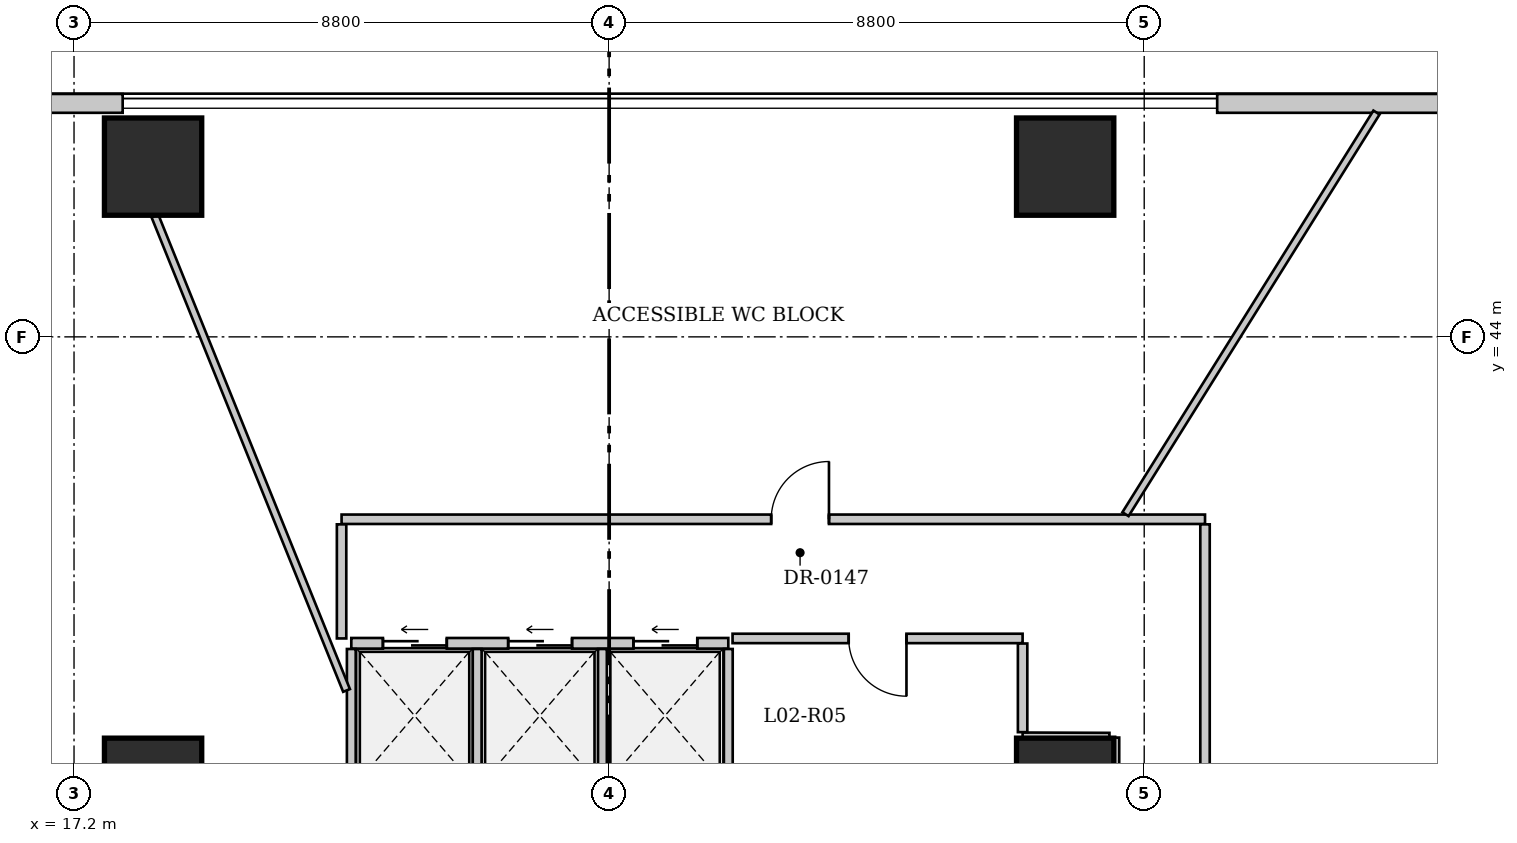
"""IFC4 building model, lengths in metres.
Left out: names, types, materials, properties, quantities, classifications, styles, units other than length and angle.
Written with IfcOpenShell. Run it as: python <this file> out.ifc"""

import sys

from ifc_helpers import new_model, si_unit, direction, frame, frame_2d, origin, origin_2d, place, context, subcontext, project, spatial, rectangle, extrude, source, transform, mapped, element, fill, save


model = new_model("IFC4")
c1 = context("Model", 3, precision=1e-05, world=origin(), true_north=direction((0.0, 1.0)))
c2 = subcontext(c1, "Body", "Model", "MODEL_VIEW")
j1 = project(units=[si_unit("LENGTHUNIT", "METRE"), si_unit("PLANEANGLEUNIT", "RADIAN")], contexts=[c1])
p1 = place(None, origin())
s1 = spatial("IfcSite", under=j1, at=p1, CompositionType="ELEMENT")
p2 = place(p1, origin())
s2 = spatial("IfcBuilding", under=s1, at=p2, CompositionType="ELEMENT")
p3 = place(p2, frame((0.0, 0.0, 9.8)))
s3 = spatial("IfcBuildingStorey", under=s2, at=p3, CompositionType="ELEMENT", Elevation=9.8)
for number, where, z_axis, x_axis in (
    (1, (18.5, 46.8, 0.0), (0.0, 0.0, 1.0), (1.0, 0.0, 0.0)),
    (2, (33.5, 46.8, 0.0), (0.0, 0.0, 1.0), (1.0, 0.0, 0.0)),
    (3, (18.5, 36.6, 0.0), (0.0, 0.0, 1.0), (1.0, 0.0, 0.0)),
    (4, (33.5, 36.6, 0.0), (0.0, 0.0, 1.0), (1.0, 0.0, 0.0)),
):
    element("IfcColumn", number, at=place(p3, frame(where, z_axis=z_axis, x_axis=x_axis)), inside=s3, PredefinedType="COLUMN", context=c2, shape_type="SweptSolid", body=[
        extrude(rectangle(XDim=1.6, YDim=1.6, at=origin_2d()), origin(), (0.0, 0.0, 1.0), 4.3),
    ])
p4 = place(p3, frame((0.16, 47.84, 0.0), z_axis=(0.0, 0.0, 1.0), x_axis=(1.0, 0.0, 0.0)))
e5 = element("IfcWall", 5, at=p4, inside=s3, PredefinedType="SOLIDWALL", context=c2, shape_type="SweptSolid", body=[
    extrude(rectangle(XDim=17.84, YDim=0.31, at=frame_2d((8.92, 0.0))), origin(), (0.0, 0.0, 1.0), 4.05),
])
p5 = place(p4, frame((7.0, 0.0, 0.95)))
e6 = element("IfcOpeningElement", 6, at=p5, cuts=e5, PredefinedType="OPENING", context=c2, shape_type="SweptSolid", body=[
    extrude(rectangle(XDim=1.4, YDim=2.2, at=frame_2d((0.7, 1.1))), frame((0.0, 0.165, 0.0), z_axis=(0.0, -1.0, 0.0), x_axis=(1.0, 0.0, 0.0)), (0.0, 0.0, 1.0), 0.33),
])
p6 = place(p4, frame((12.5, 0.0, 0.95)))
e7 = element("IfcOpeningElement", 7, at=p6, cuts=e5, PredefinedType="OPENING", context=c2, shape_type="SweptSolid", body=[
    extrude(rectangle(XDim=1.4, YDim=2.2, at=frame_2d((0.7, 1.1))), frame((0.0, 0.165, 0.0), z_axis=(0.0, -1.0, 0.0), x_axis=(1.0, 0.0, 0.0)), (0.0, 0.0, 1.0), 0.33),
])
p7 = place(p3, frame((36.0, 47.84, 0.0), z_axis=(0.0, 0.0, 1.0), x_axis=(1.0, 0.0, 0.0)))
e8 = element("IfcWall", 8, at=p7, inside=s3, PredefinedType="SOLIDWALL", context=c2, shape_type="SweptSolid", body=[
    extrude(rectangle(XDim=15.84, YDim=0.31, at=frame_2d((7.92, 0.0))), origin(), (0.0, 0.0, 1.0), 4.05),
])
p8 = place(p7, frame((4.05, 0.0, 0.95)))
e9 = element("IfcOpeningElement", 9, at=p8, cuts=e8, PredefinedType="OPENING", context=c2, shape_type="SweptSolid", body=[
    extrude(rectangle(XDim=1.4, YDim=2.2, at=frame_2d((0.7, 1.1))), frame((0.0, 0.165, 0.0), z_axis=(0.0, -1.0, 0.0), x_axis=(1.0, 0.0, 0.0)), (0.0, 0.0, 1.0), 0.33),
])
p9 = place(p7, frame((10.0, 0.0, 0.95)))
e10 = element("IfcOpeningElement", 10, at=p9, cuts=e8, PredefinedType="OPENING", context=c2, shape_type="SweptSolid", body=[
    extrude(rectangle(XDim=1.4, YDim=2.2, at=frame_2d((0.7, 1.1))), frame((0.0, 0.165, 0.0), z_axis=(0.0, -1.0, 0.0), x_axis=(1.0, 0.0, 0.0)), (0.0, 0.0, 1.0), 0.33),
])
p10 = place(p3, frame((21.76, 38.96, 0.0), z_axis=(0.0, 0.0, 1.0), x_axis=(1.0, 0.0, 0.0)))
e11 = element("IfcWall", 11, at=p10, inside=s3, PredefinedType="SOLIDWALL", context=c2, shape_type="SweptSolid", body=[
    extrude(rectangle(XDim=6.2, YDim=0.175, at=frame_2d((3.1, 0.0))), origin(), (0.0, 0.0, 1.0), 4.3),
])
p11 = place(p10, frame((0.52, 0.0, 0.0)))
e12 = element("IfcOpeningElement", 12, at=p11, cuts=e11, PredefinedType="OPENING", context=c2, shape_type="SweptSolid", body=[
    extrude(rectangle(XDim=1.05, YDim=2.15, at=frame_2d((0.525, 1.075))), frame((0.0, 0.098, 0.0), z_axis=(0.0, -1.0, 0.0), x_axis=(1.0, 0.0, 0.0)), (0.0, 0.0, 1.0), 0.195),
])
p12 = place(p10, frame((2.58, 0.0, 0.0)))
e13 = element("IfcOpeningElement", 13, at=p12, cuts=e11, PredefinedType="OPENING", context=c2, shape_type="SweptSolid", body=[
    extrude(rectangle(XDim=1.05, YDim=2.15, at=frame_2d((0.525, 1.075))), frame((0.0, 0.098, 0.0), z_axis=(0.0, -1.0, 0.0), x_axis=(1.0, 0.0, 0.0)), (0.0, 0.0, 1.0), 0.195),
])
p13 = place(p10, frame((4.64, 0.0, 0.0)))
e14 = element("IfcOpeningElement", 14, at=p13, cuts=e11, PredefinedType="OPENING", context=c2, shape_type="SweptSolid", body=[
    extrude(rectangle(XDim=1.05, YDim=2.15, at=frame_2d((0.525, 1.075))), frame((0.0, 0.098, 0.0), z_axis=(0.0, -1.0, 0.0), x_axis=(1.0, 0.0, 0.0)), (0.0, 0.0, 1.0), 0.195),
])
for number, where, z_axis, x_axis in (
    (15, (21.76, 36.6, 0.0), (0.0, 0.0, 1.0), (0.0, 1.0, 0.0)),
    (16, (27.96, 36.6, 0.0), (0.0, 0.0, 1.0), (0.0, 1.0, 0.0)),
):
    element("IfcWall", number, at=place(p3, frame(where, z_axis=z_axis, x_axis=x_axis)), inside=s3, PredefinedType="SOLIDWALL", context=c2, shape_type="SweptSolid", body=[
        extrude(rectangle(XDim=2.266, YDim=0.145, at=frame_2d((1.133, 0.0))), origin(), (0.0, 0.0, 1.0), 4.3),
    ])
for number, where, z_axis, x_axis in (
    (17, (23.83, 36.66, 0.0), (0.0, 0.0, 1.0), (0.0, 1.0, 0.0)),
    (18, (25.89, 36.66, 0.0), (0.0, 0.0, 1.0), (0.0, 1.0, 0.0)),
):
    element("IfcWall", number, at=place(p3, frame(where, z_axis=z_axis, x_axis=x_axis)), inside=s3, PredefinedType="SOLIDWALL", context=c2, shape_type="SweptSolid", body=[
        extrude(rectangle(XDim=2.207, YDim=0.145, at=frame_2d((1.103, 0.0))), origin(), (0.0, 0.0, 1.0), 4.3),
    ])
p14 = place(p3, frame((32.8, 39.04, 0.0), z_axis=(0.0, 0.0, 1.0), x_axis=(-1.0, 0.0, 0.0)))
e19 = element("IfcWall", 19, at=p14, inside=s3, PredefinedType="PARTITIONING", context=c2, shape_type="SweptSolid", body=[
    extrude(rectangle(XDim=4.77, YDim=0.155, at=frame_2d((2.385, 0.0))), origin(), (0.0, 0.0, 1.0), 4.3),
])
p15 = place(p14, frame((1.91, 0.0, 0.0)))
e20 = element("IfcOpeningElement", 20, at=p15, cuts=e19, PredefinedType="OPENING", context=c2, shape_type="SweptSolid", body=[
    extrude(rectangle(XDim=0.95, YDim=2.15, at=frame_2d((0.475, 1.075))), frame((0.0, 0.087, 0.0), z_axis=(0.0, -1.0, 0.0), x_axis=(1.0, 0.0, 0.0)), (0.0, 0.0, 1.0), 0.175),
])
p16 = place(p3, frame((21.6, 41.0, 0.0), z_axis=(0.0, 0.0, 1.0), x_axis=(1.0, 0.0, 0.0)))
e21 = element("IfcWall", 21, at=p16, inside=s3, PredefinedType="PARTITIONING", context=c2, shape_type="SweptSolid", body=[
    extrude(rectangle(XDim=14.2, YDim=0.155, at=frame_2d((7.1, 0.0))), origin(), (0.0, 0.0, 1.0), 4.3),
])
p17 = place(p16, frame((7.065, 0.0, 0.0)))
e22 = element("IfcOpeningElement", 22, at=p17, cuts=e21, PredefinedType="OPENING", context=c2, shape_type="SweptSolid", body=[
    extrude(rectangle(XDim=0.95, YDim=2.15, at=frame_2d((0.475, 1.075))), frame((0.0, 0.087, 0.0), z_axis=(0.0, -1.0, 0.0), x_axis=(1.0, 0.0, 0.0)), (0.0, 0.0, 1.0), 0.175),
])
p18 = place(p3, frame((35.8, 40.917, 0.0), z_axis=(0.0, 0.0, 1.0), x_axis=(0.0, -1.0, 0.0)))
e23 = element("IfcWall", 23, at=p18, inside=s3, PredefinedType="PARTITIONING", context=c2, shape_type="SweptSolid", body=[
    extrude(rectangle(XDim=14.796, YDim=0.155, at=frame_2d((7.398, 0.0))), origin(), (0.0, 0.0, 1.0), 4.3),
])
p19 = place(p18, frame((5.195, 0.0, 0.0)))
e24 = element("IfcOpeningElement", 24, at=p19, cuts=e23, PredefinedType="OPENING", context=c2, shape_type="SweptSolid", body=[
    extrude(rectangle(XDim=1.0, YDim=2.15, at=frame_2d((0.5, 1.075))), frame((0.0, 0.087, 0.0), z_axis=(0.0, -1.0, 0.0), x_axis=(1.0, 0.0, 0.0)), (0.0, 0.0, 1.0), 0.175),
])
p20 = place(p3, frame((34.311, 35.873, 0.0), z_axis=(0.0, 0.0, 1.0), x_axis=(0.000476644369, 0.999999886405, 0.0)))
e25 = element("IfcWall", 25, at=p20, inside=s3, PredefinedType="PARTITIONING", context=c2, shape_type="SweptSolid", body=[
    extrude(rectangle(XDim=1.537, YDim=0.155, at=frame_2d((0.768, 0.0))), origin(), (0.0, 0.0, 1.0), 4.3),
])
p21 = place(p3, frame((34.228, 37.41, 0.0), z_axis=(0.0, 0.0, 1.0), x_axis=(-0.999993554729, 0.003590334185, 0.0)))
e26 = element("IfcWall", 26, at=p21, inside=s3, PredefinedType="PARTITIONING", context=c2, shape_type="SweptSolid", body=[
    extrude(rectangle(XDim=1.428, YDim=0.155, at=frame_2d((0.714, 0.0))), origin(), (0.0, 0.0, 1.0), 4.3),
])
p22 = place(p3, frame((32.8, 37.499, 0.0), z_axis=(0.0, 0.0, 1.0), x_axis=(0.0, 1.0, 0.0)))
e27 = element("IfcWall", 27, at=p22, inside=s3, PredefinedType="PARTITIONING", context=c2, shape_type="SweptSolid", body=[
    extrude(rectangle(XDim=1.458, YDim=0.155, at=frame_2d((0.729, 0.0))), origin(), (0.0, 0.0, 1.0), 4.3),
])
p23 = place(p3, frame((21.6, 39.04, 0.0), z_axis=(0.0, 0.0, 1.0), x_axis=(0.0, 1.0, 0.0)))
e28 = element("IfcWall", 28, at=p23, inside=s3, PredefinedType="PARTITIONING", context=c2, shape_type="SweptSolid", body=[
    extrude(rectangle(XDim=1.876, YDim=0.155, at=frame_2d((0.938, 0.0))), origin(), (0.0, 0.0, 1.0), 4.3),
])
p24 = place(p3, frame((34.492, 41.083, 0.0), z_axis=(0.0, 0.0, 1.0), x_axis=(0.529897521228, 0.848061682306, 0.0)))
e29 = element("IfcWall", 29, at=p24, inside=s3, PredefinedType="PARTITIONING", context=c2, shape_type="SweptSolid", body=[
    extrude(rectangle(XDim=7.79, YDim=0.12, at=frame_2d((3.895, 0.0))), origin(), (0.0, 0.0, 1.0), 4.3),
])
p25 = place(p3, frame((21.681, 38.184, 0.0), z_axis=(0.0, 0.0, 1.0), x_axis=(-0.374369058087, 0.927279789679, 0.0)))
e30 = element("IfcWall", 30, at=p25, inside=s3, PredefinedType="PARTITIONING", context=c2, shape_type="SweptSolid", body=[
    extrude(rectangle(XDim=8.418, YDim=0.12, at=frame_2d((4.209, 0.0))), origin(), (0.0, 0.0, 1.0), 4.3),
])
m1 = source(origin(), c2, "Body", "SweptSolid", [
    extrude(rectangle(XDim=1.05, YDim=2.15, at=frame_2d((0.525, 1.075))), frame((0.0, 0.025, 0.0), z_axis=(0.0, -1.0, 0.0), x_axis=(1.0, 0.0, 0.0)), (0.0, 0.0, 1.0), 0.05),
])
p26 = place(p11, origin())
e31 = element("IfcDoor", 31, at=p26, inside=s3, OperationType="SLIDING_TO_LEFT", PredefinedType="DOOR", context=c2, shape_type="MappedRepresentation", body=[
    mapped(m1, transform((0.0, 0.0, 0.0), x_axis=(1.0, 0.0, 0.0), y_axis=(0.0, 1.0, 0.0), z_axis=(0.0, 0.0, 1.0), scale=1.0)),
])
fill(e12, e31)
p27 = place(p12, origin())
e32 = element("IfcDoor", 32, at=p27, inside=s3, OperationType="SLIDING_TO_LEFT", PredefinedType="DOOR", context=c2, shape_type="MappedRepresentation", body=[
    mapped(m1, transform((0.0, 0.0, 0.0), x_axis=(1.0, 0.0, 0.0), y_axis=(0.0, 1.0, 0.0), z_axis=(0.0, 0.0, 1.0), scale=1.0)),
])
fill(e13, e32)
p28 = place(p13, origin())
e33 = element("IfcDoor", 33, at=p28, inside=s3, OperationType="SLIDING_TO_LEFT", PredefinedType="DOOR", context=c2, shape_type="MappedRepresentation", body=[
    mapped(m1, transform((0.0, 0.0, 0.0), x_axis=(1.0, 0.0, 0.0), y_axis=(0.0, 1.0, 0.0), z_axis=(0.0, 0.0, 1.0), scale=1.0)),
])
fill(e14, e33)
m2 = source(origin(), c2, "Body", "SweptSolid", [
    extrude(rectangle(XDim=0.95, YDim=2.15, at=frame_2d((0.475, 1.075))), frame((0.0, 0.025, 0.0), z_axis=(0.0, -1.0, 0.0), x_axis=(1.0, 0.0, 0.0)), (0.0, 0.0, 1.0), 0.05),
])
p29 = place(p15, origin())
e34 = element("IfcDoor", 34, at=p29, inside=s3, OperationType="SINGLE_SWING_LEFT", PredefinedType="DOOR", context=c2, shape_type="MappedRepresentation", body=[
    mapped(m2, transform((0.0, 0.0, 0.0), x_axis=(1.0, 0.0, 0.0), y_axis=(0.0, 1.0, 0.0), z_axis=(0.0, 0.0, 1.0), scale=1.0)),
])
fill(e20, e34)
p30 = place(p17, origin())
e35 = element("IfcDoor", 35, at=p30, inside=s3, OperationType="SINGLE_SWING_RIGHT", PredefinedType="DOOR", context=c2, shape_type="MappedRepresentation", body=[
    mapped(m2, transform((0.0, 0.0, 0.0), x_axis=(1.0, 0.0, 0.0), y_axis=(0.0, 1.0, 0.0), z_axis=(0.0, 0.0, 1.0), scale=1.0)),
])
fill(e22, e35)
save(model, sys.argv[1])
